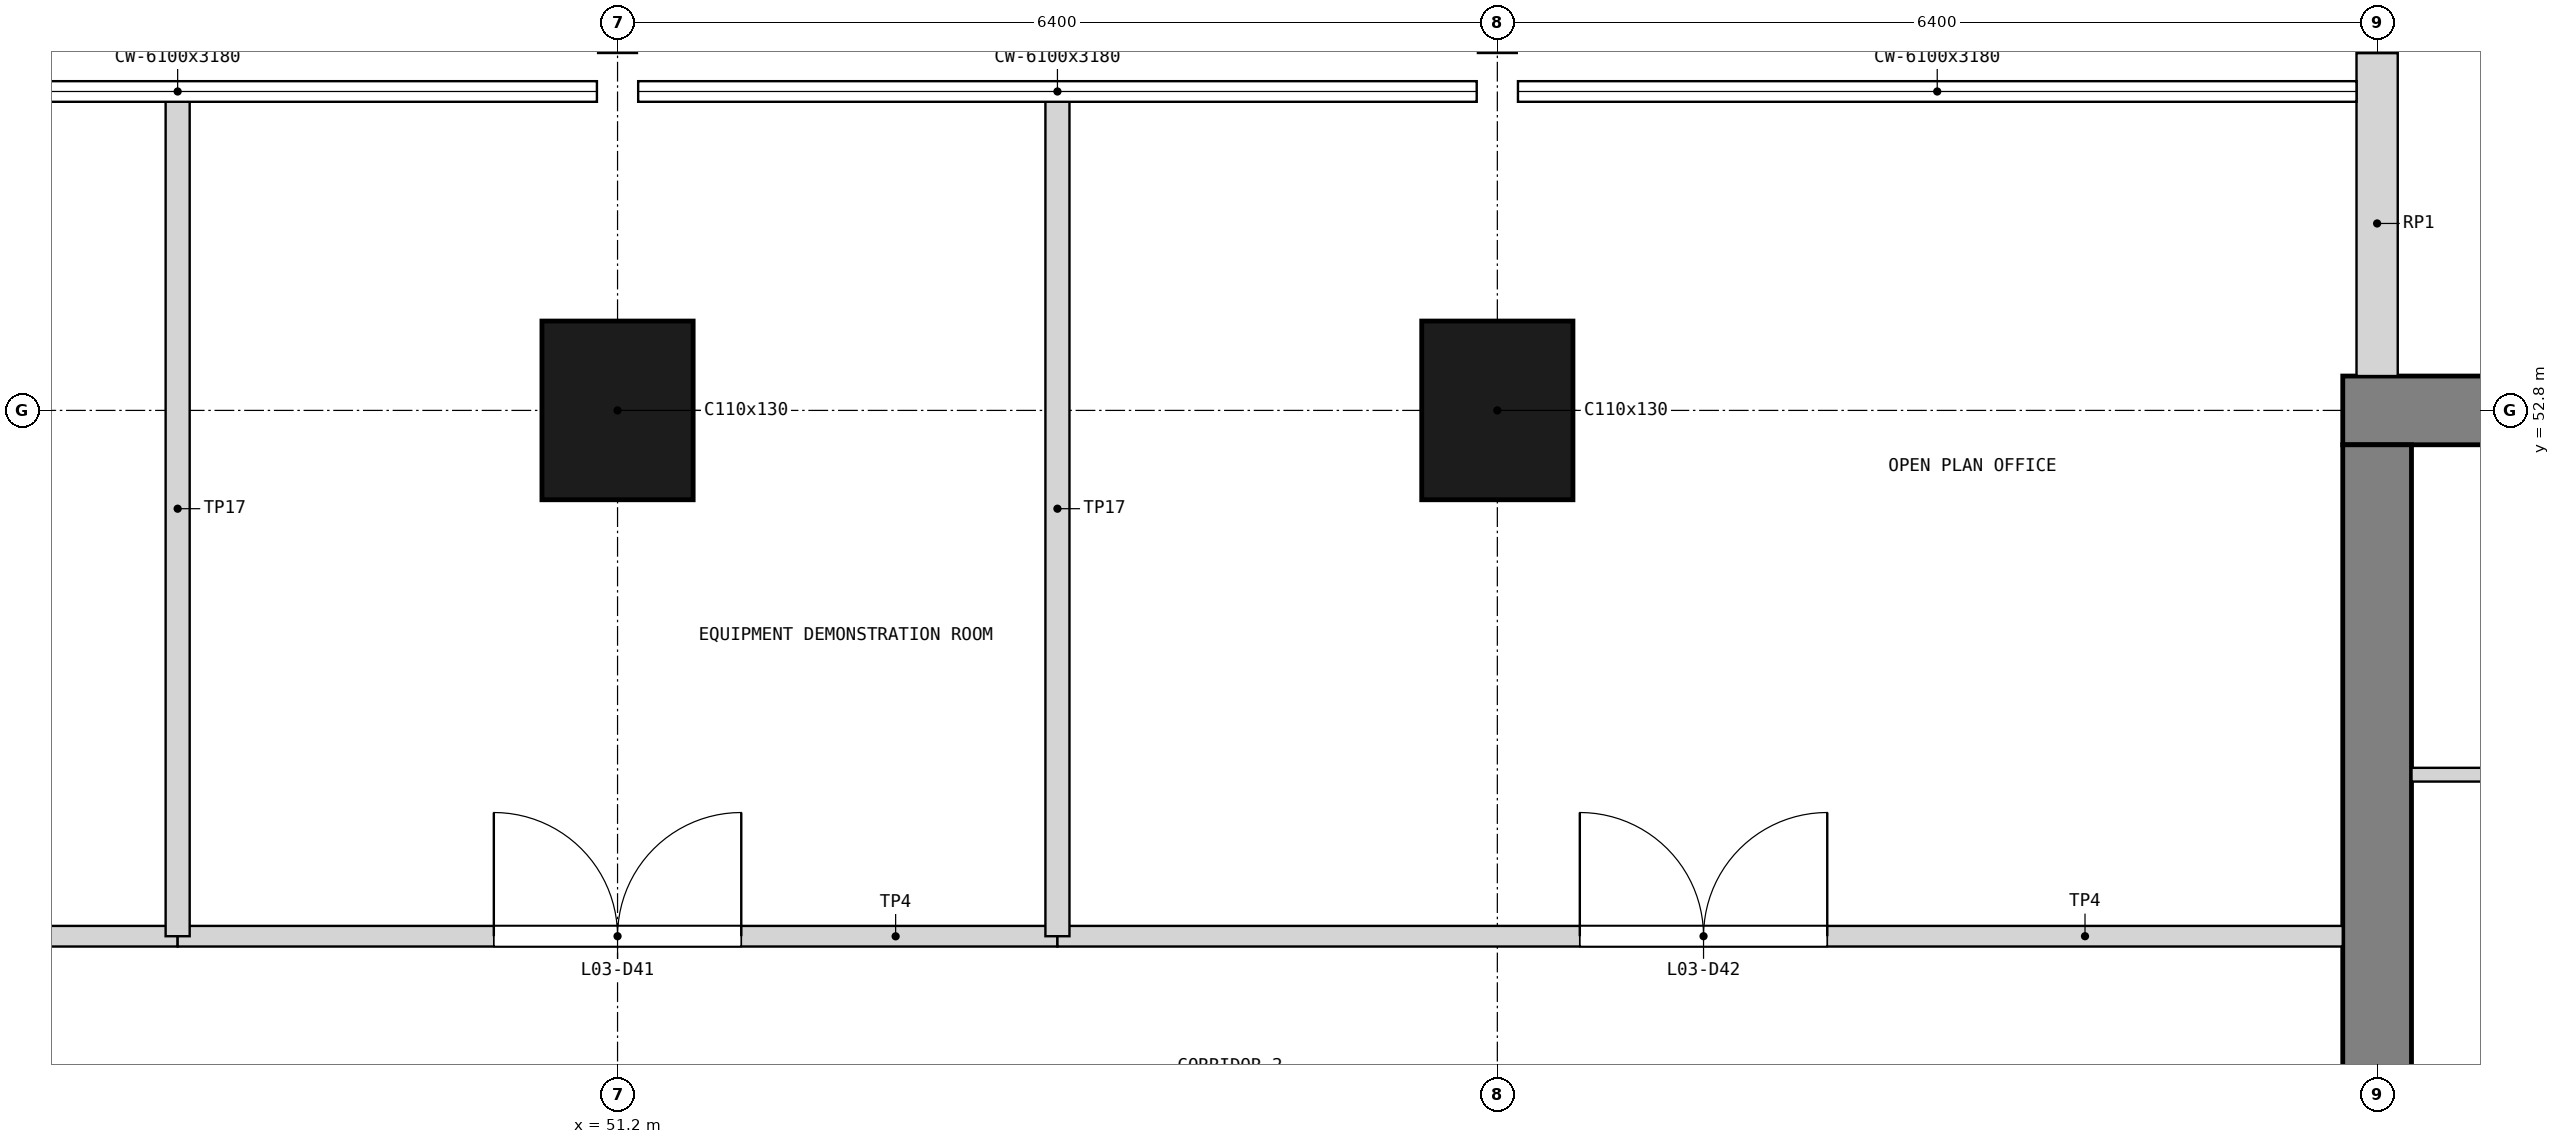
"""IFC4 building model, lengths in metres.
Left out: names, types, materials, properties, quantities, classifications, styles, units other than length and angle.
Written with IfcOpenShell. Run it as: python <this file> out.ifc"""

import sys

from ifc_helpers import new_model, si_unit, direction, frame, frame_2d, origin, origin_2d, place, context, subcontext, project, spatial, rectangle, extrude, element, fill, save


model = new_model("IFC4")
c1 = context("Model", 3, precision=1e-05, world=origin(), true_north=direction((0.0, 1.0)))
c2 = subcontext(c1, "Body", "Model", "MODEL_VIEW")
j1 = project(units=[si_unit("LENGTHUNIT", "METRE"), si_unit("PLANEANGLEUNIT", "RADIAN")], contexts=[c1])
p1 = place(None, origin())
s1 = spatial("IfcSite", under=j1, at=p1, CompositionType="ELEMENT")
p2 = place(p1, origin())
s2 = spatial("IfcBuilding", under=s1, at=p2, CompositionType="ELEMENT")
p3 = place(p2, frame((0.0, 0.0, 12.9)))
s3 = spatial("IfcBuildingStorey", under=s2, at=p3, CompositionType="ELEMENT", Elevation=12.9)
p4 = place(p3, frame((63.75, 52.8, 0.0), z_axis=(0.0, 0.0, 1.0), x_axis=(1.0, 0.0, 0.0)))
e1 = element("IfcWall", 1, at=p4, inside=s3, PredefinedType="SHEAR", context=c2, shape_type="SweptSolid", body=[
    extrude(rectangle(XDim=13.3, YDim=0.5, at=frame_2d((6.65, 0.0))), origin(), (0.0, 0.0, 1.0), 4.2),
])
p5 = place(p4, frame((11.05, 0.0, 1.0)))
e2 = element("IfcOpeningElement", 2, at=p5, cuts=e1, PredefinedType="OPENING", context=c2, shape_type="SweptSolid", body=[
    extrude(rectangle(XDim=0.4, YDim=2.0, at=frame_2d((0.2, 1.0))), frame((0.0, 0.26, 0.0), z_axis=(0.0, -1.0, 0.0), x_axis=(1.0, 0.0, 0.0)), (0.0, 0.0, 1.0), 0.52),
])
p6 = place(p3, frame((64.0, 33.85, 0.0), z_axis=(0.0, 0.0, 1.0), x_axis=(0.0, 1.0, 0.0)))
e3 = element("IfcWall", 3, at=p6, inside=s3, PredefinedType="SHEAR", context=c2, shape_type="SweptSolid", body=[
    extrude(rectangle(XDim=18.7, YDim=0.5, at=frame_2d((9.35, 0.0))), origin(), (0.0, 0.0, 1.0), 4.2),
])
p7 = place(p6, frame((8.35, 0.0, 0.0)))
e4 = element("IfcOpeningElement", 4, at=p7, cuts=e3, PredefinedType="OPENING", context=c2, shape_type="SweptSolid", body=[
    extrude(rectangle(XDim=2.0, YDim=2.1, at=frame_2d((1.0, 1.05))), frame((0.0, 0.26, 0.0), z_axis=(0.0, -1.0, 0.0), x_axis=(1.0, 0.0, 0.0)), (0.0, 0.0, 1.0), 0.52),
])
for number, where, z_axis, x_axis in (
    (5, (51.2, 52.8, 0.0), (0.0, 0.0, 1.0), (1.0, 0.0, 0.0)),
    (6, (57.6, 52.8, 0.0), (0.0, 0.0, 1.0), (1.0, 0.0, 0.0)),
):
    element("IfcColumn", number, at=place(p3, frame(where, z_axis=z_axis, x_axis=x_axis)), inside=s3, PredefinedType="COLUMN", context=c2, shape_type="SweptSolid", body=[
        extrude(rectangle(XDim=1.1, YDim=1.3, at=origin_2d()), origin(), (0.0, 0.0, 1.0), 4.2),
    ])
p8 = place(p3, frame((64.0, 53.05, 0.0), z_axis=(0.0, 0.0, 1.0), x_axis=(0.0, 1.0, 0.0)))
e7 = element("IfcWall", 7, at=p8, inside=s3, PredefinedType="SOLIDWALL", context=c2, shape_type="SweptSolid", body=[
    extrude(rectangle(XDim=2.35, YDim=0.3, at=frame_2d((1.175, 0.0))), origin(), (0.0, 0.0, 1.0), 3.18),
])
p9 = place(p3, frame((69.475, 50.15, 0.0), z_axis=(0.0, 0.0, 1.0), x_axis=(-1.0, 0.0, 0.0)))
e8 = element("IfcWall", 8, at=p9, inside=s3, PredefinedType="PARTITIONING", context=c2, shape_type="SweptSolid", body=[
    extrude(rectangle(XDim=5.225, YDim=0.1, at=frame_2d((2.613, 0.0))), origin(), (0.0, 0.0, 1.0), 3.9),
])
p10 = place(p3, frame((41.6, 48.975, 0.0), z_axis=(0.0, 0.0, 1.0), x_axis=(1.0, 0.0, 0.0)))
e9 = element("IfcWall", 9, at=p10, inside=s3, PredefinedType="PARTITIONING", context=c2, shape_type="SweptSolid", body=[
    extrude(rectangle(XDim=6.4, YDim=0.15, at=frame_2d((3.2, 0.0))), origin(), (0.0, 0.0, 1.0), 3.98),
])
p11 = place(p10, frame((2.7, 0.0, 0.0)))
e10 = element("IfcOpeningElement", 10, at=p11, cuts=e9, PredefinedType="OPENING", context=c2, shape_type="SweptSolid", body=[
    extrude(rectangle(XDim=1.0, YDim=2.1, at=frame_2d((0.5, 1.05))), frame((0.0, 0.085, 0.0), z_axis=(0.0, -1.0, 0.0), x_axis=(1.0, 0.0, 0.0)), (0.0, 0.0, 1.0), 0.17),
])
p12 = place(p3, frame((48.0, 48.975, 0.0), z_axis=(0.0, 0.0, 1.0), x_axis=(1.0, 0.0, 0.0)))
e11 = element("IfcWall", 11, at=p12, inside=s3, PredefinedType="PARTITIONING", context=c2, shape_type="SweptSolid", body=[
    extrude(rectangle(XDim=6.4, YDim=0.15, at=frame_2d((3.2, 0.0))), origin(), (0.0, 0.0, 1.0), 3.98),
])
p13 = place(p12, frame((2.3, 0.0, 0.0)))
e12 = element("IfcOpeningElement", 12, at=p13, cuts=e11, PredefinedType="OPENING", context=c2, shape_type="SweptSolid", body=[
    extrude(rectangle(XDim=1.8, YDim=2.1, at=frame_2d((0.9, 1.05))), frame((0.0, 0.085, 0.0), z_axis=(0.0, -1.0, 0.0), x_axis=(1.0, 0.0, 0.0)), (0.0, 0.0, 1.0), 0.17),
])
p14 = place(p3, frame((54.4, 48.975, 0.0), z_axis=(0.0, 0.0, 1.0), x_axis=(1.0, 0.0, 0.0)))
e13 = element("IfcWall", 13, at=p14, inside=s3, PredefinedType="PARTITIONING", context=c2, shape_type="SweptSolid", body=[
    extrude(rectangle(XDim=9.35, YDim=0.15, at=frame_2d((4.675, 0.0))), origin(), (0.0, 0.0, 1.0), 3.98),
])
p15 = place(p14, frame((3.8, 0.0, 0.0)))
e14 = element("IfcOpeningElement", 14, at=p15, cuts=e13, PredefinedType="OPENING", context=c2, shape_type="SweptSolid", body=[
    extrude(rectangle(XDim=1.8, YDim=2.1, at=frame_2d((0.9, 1.05))), frame((0.0, 0.085, 0.0), z_axis=(0.0, -1.0, 0.0), x_axis=(1.0, 0.0, 0.0)), (0.0, 0.0, 1.0), 0.17),
])
for number, where, z_axis, x_axis in (
    (15, (48.0, 48.975, 0.0), (0.0, 0.0, 1.0), (0.0, 1.0, 0.0)),
    (16, (54.4, 48.975, 0.0), (0.0, 0.0, 1.0), (0.0, 1.0, 0.0)),
):
    element("IfcWall", number, at=place(p3, frame(where, z_axis=z_axis, x_axis=x_axis)), inside=s3, PredefinedType="PARTITIONING", context=c2, shape_type="SweptSolid", body=[
        extrude(rectangle(XDim=6.125, YDim=0.175, at=frame_2d((3.062, 0.0))), origin(), (0.0, 0.0, 1.0), 3.38),
    ])
p16 = place(p13, origin())
e17 = element("IfcDoor", 17, at=p16, inside=s3, OperationType="DOUBLE_DOOR_SINGLE_SWING", PredefinedType="DOOR", context=c2, shape_type="SweptSolid", body=[
    extrude(rectangle(XDim=1.8, YDim=2.1, at=frame_2d((0.9, 1.05))), frame((0.0, 0.025, 0.0), z_axis=(0.0, -1.0, 0.0), x_axis=(1.0, 0.0, 0.0)), (0.0, 0.0, 1.0), 0.05),
])
fill(e12, e17)
p17 = place(p15, origin())
e18 = element("IfcDoor", 18, at=p17, inside=s3, OperationType="DOUBLE_DOOR_SINGLE_SWING", PredefinedType="DOOR", context=c2, shape_type="SweptSolid", body=[
    extrude(rectangle(XDim=1.8, YDim=2.1, at=frame_2d((0.9, 1.05))), frame((0.0, 0.025, 0.0), z_axis=(0.0, -1.0, 0.0), x_axis=(1.0, 0.0, 0.0)), (0.0, 0.0, 1.0), 0.05),
])
fill(e14, e18)
save(model, sys.argv[1])
